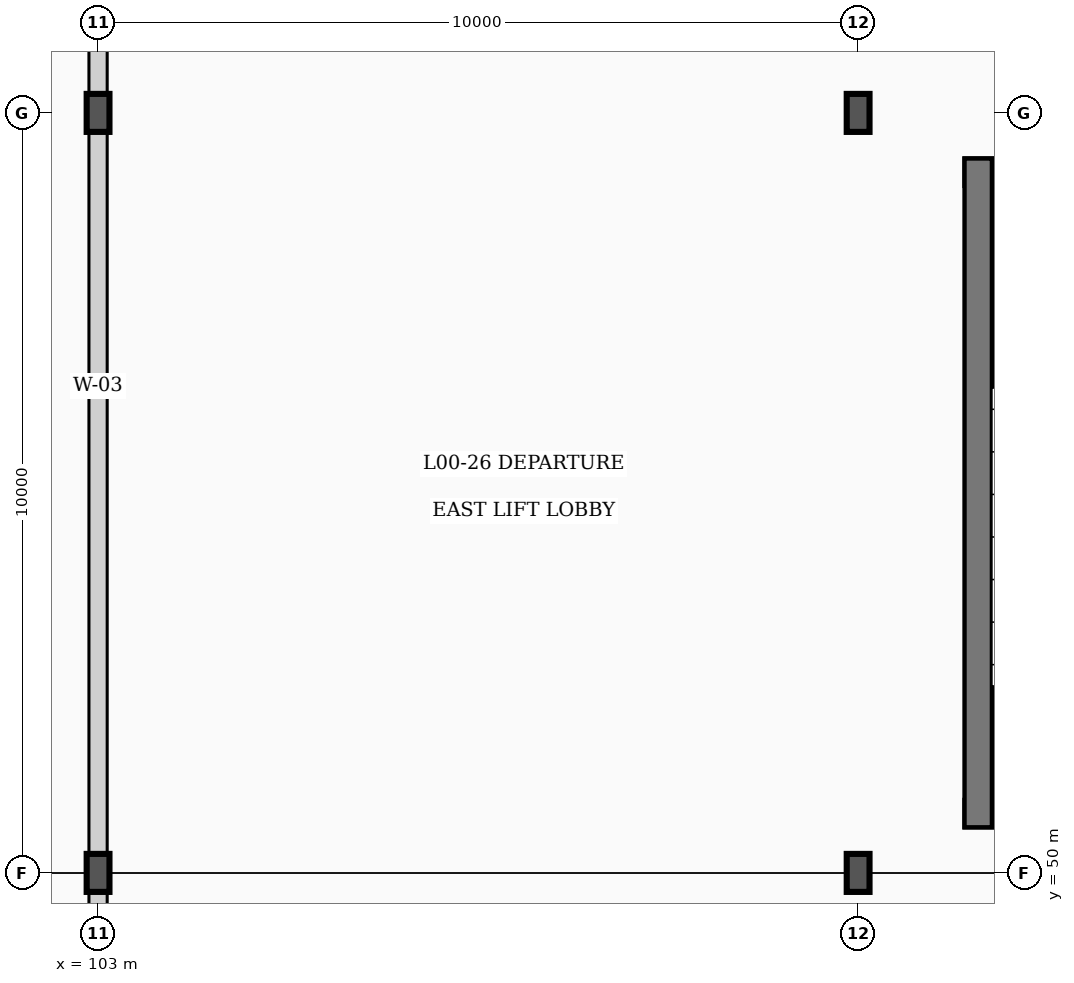
"""IFC4 building model, lengths in metres.
Left out: names, types, materials, properties, quantities, classifications, styles, units other than length and angle.
Written with IfcOpenShell. Run it as: python <this file> out.ifc"""

import sys

from ifc_helpers import new_model, si_unit, direction, frame, frame_2d, origin, origin_2d, place, context, subcontext, project, spatial, rectangle, i_section, extrude, element, save


model = new_model("IFC4")
c1 = context("Model", 3, precision=1e-05, world=origin(), true_north=direction((0.0, 1.0)))
c2 = subcontext(c1, "Body", "Model", "MODEL_VIEW")
j1 = project(units=[si_unit("LENGTHUNIT", "METRE"), si_unit("PLANEANGLEUNIT", "RADIAN")], contexts=[c1])
p1 = place(None, origin())
s1 = spatial("IfcSite", under=j1, at=p1, CompositionType="ELEMENT")
p2 = place(p1, origin())
s2 = spatial("IfcBuilding", under=s1, at=p2, CompositionType="ELEMENT")
p3 = place(p2, origin())
s3 = spatial("IfcBuildingStorey", under=s2, at=p3, CompositionType="ELEMENT", Elevation=0.0)
for number, where, z_axis, x_axis in (
    (1, (103.0, 50.0, 0.0), (0.0, 0.0, 1.0), (1.0, 0.0, 0.0)),
    (2, (103.0, 60.0, 0.0), (0.0, 0.0, 1.0), (1.0, 0.0, 0.0)),
    (3, (113.0, 50.0, 0.0), (0.0, 0.0, 1.0), (1.0, 0.0, 0.0)),
    (4, (113.0, 60.0, 0.0), (0.0, 0.0, 1.0), (1.0, 0.0, 0.0)),
):
    element("IfcColumn", number, at=place(p3, frame(where, z_axis=z_axis, x_axis=x_axis)), inside=s3, PredefinedType="COLUMN", context=c2, shape_type="SweptSolid", body=[
        extrude(i_section(OverallWidth=0.3, OverallDepth=0.5, WebThickness=0.014, FlangeThickness=0.028, FilletRadius=0.027, at=origin_2d()), origin(), (0.0, 0.0, 1.0), 5.4),
    ])
p4 = place(p3, frame((114.4, 50.78, 0.0), z_axis=(0.0, 0.0, 1.0), x_axis=(1.0, 0.0, 0.0)))
e5 = element("IfcWall", 5, at=p4, inside=s3, PredefinedType="SHEAR", context=c2, shape_type="SweptSolid", body=[
    extrude(rectangle(XDim=6.68, YDim=0.36, at=frame_2d((3.34, 0.0))), origin(), (0.0, 0.0, 1.0), 5.4),
])
p5 = place(p4, frame((0.51, 0.0, 0.0)))
e6 = element("IfcOpeningElement", 6, at=p5, cuts=e5, PredefinedType="OPENING", context=c2, shape_type="SweptSolid", body=[
    extrude(rectangle(XDim=1.45, YDim=2.4, at=frame_2d((0.725, 1.2))), frame((0.0, 0.19, 0.0), z_axis=(0.0, -1.0, 0.0), x_axis=(1.0, 0.0, 0.0)), (0.0, 0.0, 1.0), 0.38),
])
p6 = place(p4, frame((4.52, 0.0, 0.0)))
e7 = element("IfcOpeningElement", 7, at=p6, cuts=e5, PredefinedType="OPENING", context=c2, shape_type="SweptSolid", body=[
    extrude(rectangle(XDim=1.2, YDim=2.35, at=frame_2d((0.6, 1.175))), frame((0.0, 0.19, 0.0), z_axis=(0.0, -1.0, 0.0), x_axis=(1.0, 0.0, 0.0)), (0.0, 0.0, 1.0), 0.38),
])
p7 = place(p3, frame((114.4, 59.22, 0.0), z_axis=(0.0, 0.0, 1.0), x_axis=(1.0, 0.0, 0.0)))
e8 = element("IfcWall", 8, at=p7, inside=s3, PredefinedType="SHEAR", context=c2, shape_type="SweptSolid", body=[
    extrude(rectangle(XDim=6.68, YDim=0.36, at=frame_2d((3.34, 0.0))), origin(), (0.0, 0.0, 1.0), 5.4),
])
p8 = place(p3, frame((114.58, 50.6, 0.0), z_axis=(0.0, 0.0, 1.0), x_axis=(0.0, 1.0, 0.0)))
e9 = element("IfcWall", 9, at=p8, inside=s3, PredefinedType="SHEAR", context=c2, shape_type="SweptSolid", body=[
    extrude(rectangle(XDim=8.8, YDim=0.36, at=frame_2d((4.4, 0.0))), origin(), (0.0, 0.0, 1.0), 5.4),
])
p9 = place(p3, frame((103.0, 20.8, 0.0), z_axis=(0.0, 0.0, 1.0), x_axis=(0.0, 1.0, 0.0)))
e10 = element("IfcWall", 10, at=p9, inside=s3, PredefinedType="PARTITIONING", context=c2, shape_type="SweptSolid", body=[
    extrude(rectangle(XDim=78.4, YDim=0.24, at=frame_2d((39.2, 0.0))), origin(), (0.0, 0.0, 1.0), 4.55),
])
p10 = place(p9, frame((14.371, 0.0, 0.0)))
e11 = element("IfcOpeningElement", 11, at=p10, cuts=e10, PredefinedType="OPENING", context=c2, shape_type="SweptSolid", body=[
    extrude(rectangle(XDim=1.05, YDim=2.45, at=frame_2d((0.525, 1.225))), frame((0.0, 0.13, 0.0), z_axis=(0.0, -1.0, 0.0), x_axis=(1.0, 0.0, 0.0)), (0.0, 0.0, 1.0), 0.26),
])
p11 = place(p9, frame((53.571, 0.0, 0.0)))
e12 = element("IfcOpeningElement", 12, at=p11, cuts=e10, PredefinedType="OPENING", context=c2, shape_type="SweptSolid", body=[
    extrude(rectangle(XDim=1.05, YDim=2.45, at=frame_2d((0.525, 1.225))), frame((0.0, 0.13, 0.0), z_axis=(0.0, -1.0, 0.0), x_axis=(1.0, 0.0, 0.0)), (0.0, 0.0, 1.0), 0.26),
])
save(model, sys.argv[1])
